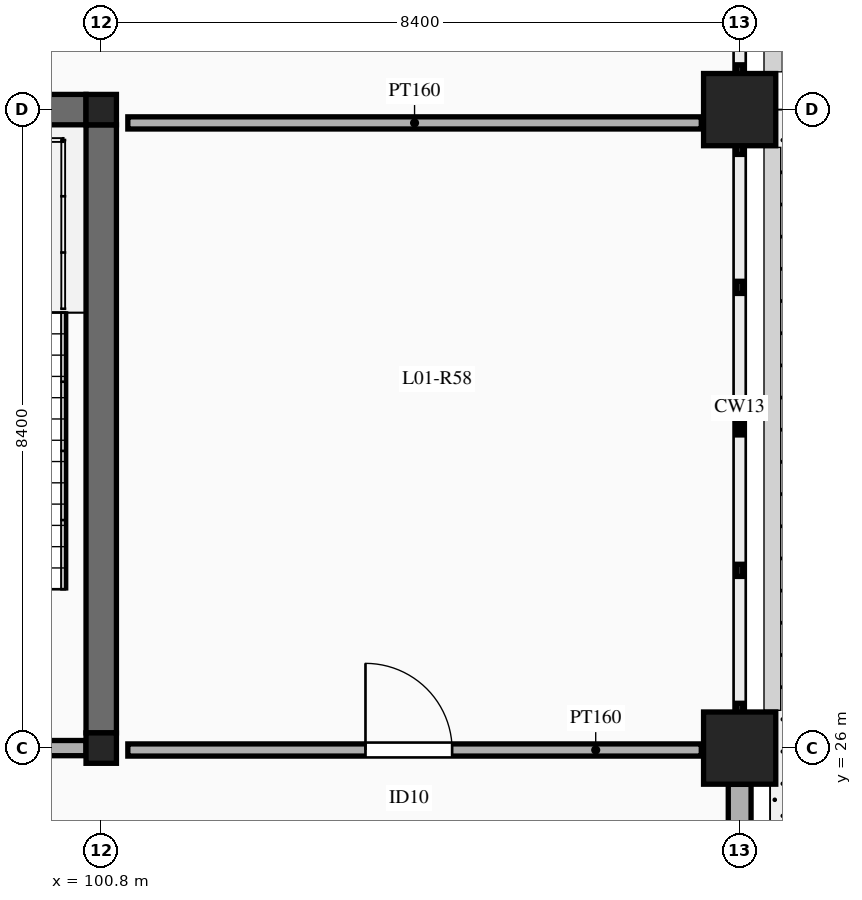
"""IFC4 building model, lengths in metres.
Left out: names, types, materials, properties, quantities, classifications, styles, units other than length and angle.
Written with IfcOpenShell. Run it as: python <this file> out.ifc"""

import sys

from ifc_helpers import new_model, si_unit, direction, frame, frame_2d, origin, origin_2d, place, context, subcontext, project, spatial, rectangle, extrude, element, fill, save


model = new_model("IFC4")
c1 = context("Model", 3, precision=1e-05, world=origin(), true_north=direction((0.0, 1.0)))
c2 = subcontext(c1, "Body", "Model", "MODEL_VIEW")
j1 = project(units=[si_unit("LENGTHUNIT", "METRE"), si_unit("PLANEANGLEUNIT", "RADIAN")], contexts=[c1])
p1 = place(None, origin())
s1 = spatial("IfcSite", under=j1, at=p1, CompositionType="ELEMENT")
p2 = place(p1, origin())
s2 = spatial("IfcBuilding", under=s1, at=p2, CompositionType="ELEMENT")
p3 = place(p2, frame((0.0, 0.0, 5.4)))
s3 = spatial("IfcBuildingStorey", under=s2, at=p3, CompositionType="ELEMENT", Elevation=5.4)
for number, where, z_axis, x_axis in (
    (1, (100.8, 26.0, 0.0), (0.0, 0.0, 1.0), (1.0, 0.0, 0.0)),
    (2, (100.8, 34.4, 0.0), (0.0, 0.0, 1.0), (1.0, 0.0, 0.0)),
):
    element("IfcColumn", number, at=place(p3, frame(where, z_axis=z_axis, x_axis=x_axis)), inside=s3, PredefinedType="COLUMN", context=c2, shape_type="SweptSolid", body=[
        extrude(rectangle(XDim=0.4, YDim=0.4, at=origin_2d()), origin(), (0.0, 0.0, 1.0), 4.8),
    ])
for number, where, z_axis, x_axis in (
    (3, (109.2, 26.0, 0.0), (0.0, 0.0, 1.0), (1.0, 0.0, 0.0)),
    (4, (109.2, 34.4, 0.0), (0.0, 0.0, 1.0), (1.0, 0.0, 0.0)),
):
    element("IfcColumn", number, at=place(p3, frame(where, z_axis=z_axis, x_axis=x_axis)), inside=s3, PredefinedType="COLUMN", context=c2, shape_type="SweptSolid", body=[
        extrude(rectangle(XDim=0.95, YDim=0.95, at=origin_2d()), origin(), (0.0, 0.0, 1.0), 4.8),
    ])
for number, where, z_axis, x_axis in (
    (5, (100.8, 26.2, 0.0), (0.0, 0.0, 1.0), (0.0, 1.0, 0.0)),
    (6, (92.6, 34.4, 0.0), (0.0, 0.0, 1.0), (1.0, 0.0, 0.0)),
):
    element("IfcWall", number, at=place(p3, frame(where, z_axis=z_axis, x_axis=x_axis)), inside=s3, PredefinedType="SHEAR", context=c2, shape_type="SweptSolid", body=[
        extrude(rectangle(XDim=8.0, YDim=0.4, at=frame_2d((4.0, 0.0))), origin(), (0.0, 0.0, 1.0), 4.8),
    ])
p4 = place(p3, frame((109.2, 18.077, 0.0), z_axis=(0.0, 0.0, 1.0), x_axis=(0.0, 1.0, 0.0)))
e7 = element("IfcWall", 7, at=p4, inside=s3, PredefinedType="SOLIDWALL", context=c2, shape_type="SweptSolid", body=[
    extrude(rectangle(XDim=7.446, YDim=0.3, at=frame_2d((3.723, 0.0))), origin(), (0.0, 0.0, 1.0), 3.85),
])
p5 = place(p4, frame((1.062, 0.0, 0.9)))
e8 = element("IfcOpeningElement", 8, at=p5, cuts=e7, PredefinedType="OPENING", context=c2, shape_type="SweptSolid", body=[
    extrude(rectangle(XDim=1.6, YDim=2.1, at=frame_2d((0.8, 1.05))), frame((0.0, 0.16, 0.0), z_axis=(0.0, -1.0, 0.0), x_axis=(1.0, 0.0, 0.0)), (0.0, 0.0, 1.0), 0.32),
])
p6 = place(p4, frame((4.784, 0.0, 0.9)))
e9 = element("IfcOpeningElement", 9, at=p6, cuts=e7, PredefinedType="OPENING", context=c2, shape_type="SweptSolid", body=[
    extrude(rectangle(XDim=1.6, YDim=2.1, at=frame_2d((0.8, 1.05))), frame((0.0, 0.16, 0.0), z_axis=(0.0, -1.0, 0.0), x_axis=(1.0, 0.0, 0.0)), (0.0, 0.0, 1.0), 0.32),
])
p7 = place(p3, frame((92.6, 26.0, 0.0), z_axis=(0.0, 0.0, 1.0), x_axis=(1.0, 0.0, 0.0)))
e10 = element("IfcWall", 10, at=p7, inside=s3, PredefinedType="SOLIDWALL", context=c2, shape_type="SweptSolid", body=[
    extrude(rectangle(XDim=8.0, YDim=0.2, at=frame_2d((4.0, 0.0))), origin(), (0.0, 0.0, 1.0), 3.88),
])
p8 = place(p7, frame((1.4, 0.0, 0.0)))
e11 = element("IfcOpeningElement", 11, at=p8, cuts=e10, PredefinedType="OPENING", context=c2, shape_type="SweptSolid", body=[
    extrude(rectangle(XDim=1.22, YDim=2.15, at=frame_2d((0.61, 1.075))), frame((0.0, 0.11, 0.0), z_axis=(0.0, -1.0, 0.0), x_axis=(1.0, 0.0, 0.0)), (0.0, 0.0, 1.0), 0.22),
])
p9 = place(p7, frame((5.3, 0.0, 0.0)))
e12 = element("IfcOpeningElement", 12, at=p9, cuts=e10, PredefinedType="OPENING", context=c2, shape_type="SweptSolid", body=[
    extrude(rectangle(XDim=1.15, YDim=2.15, at=frame_2d((0.575, 1.075))), frame((0.0, 0.11, 0.0), z_axis=(0.0, -1.0, 0.0), x_axis=(1.0, 0.0, 0.0)), (0.0, 0.0, 1.0), 0.22),
])
p10 = place(p3, frame((101.15, 25.975, 0.0), z_axis=(0.0, 0.0, 1.0), x_axis=(1.0, 0.0, 0.0)))
e13 = element("IfcWall", 13, at=p10, inside=s3, PredefinedType="PARTITIONING", context=c2, shape_type="SweptSolid", body=[
    extrude(rectangle(XDim=7.545, YDim=0.16, at=frame_2d((3.772, 0.0))), origin(), (0.0, 0.0, 1.0), 2.95),
])
p11 = place(p10, frame((3.127, 0.0, 0.0)))
e14 = element("IfcOpeningElement", 14, at=p11, cuts=e13, PredefinedType="OPENING", context=c2, shape_type="SweptSolid", body=[
    extrude(rectangle(XDim=1.14, YDim=2.22, at=frame_2d((0.57, 1.11))), frame((0.0, 0.09, 0.0), z_axis=(0.0, -1.0, 0.0), x_axis=(1.0, 0.0, 0.0)), (0.0, 0.0, 1.0), 0.18),
])
p12 = place(p3, frame((101.15, 34.225, 0.0), z_axis=(0.0, 0.0, 1.0), x_axis=(1.0, 0.0, 0.0)))
e15 = element("IfcWall", 15, at=p12, inside=s3, PredefinedType="PARTITIONING", context=c2, shape_type="SweptSolid", body=[
    extrude(rectangle(XDim=7.545, YDim=0.16, at=frame_2d((3.772, 0.0))), origin(), (0.0, 0.0, 1.0), 2.95),
])
p13 = place(p11, origin())
e16 = element("IfcDoor", 16, at=p13, inside=s3, OperationType="SINGLE_SWING_LEFT", PredefinedType="DOOR", context=c2, shape_type="SweptSolid", body=[
    extrude(rectangle(XDim=1.14, YDim=2.22, at=frame_2d((0.57, 1.11))), frame((0.0, 0.025, 0.0), z_axis=(0.0, -1.0, 0.0), x_axis=(1.0, 0.0, 0.0)), (0.0, 0.0, 1.0), 0.05),
])
fill(e14, e16)
save(model, sys.argv[1])
